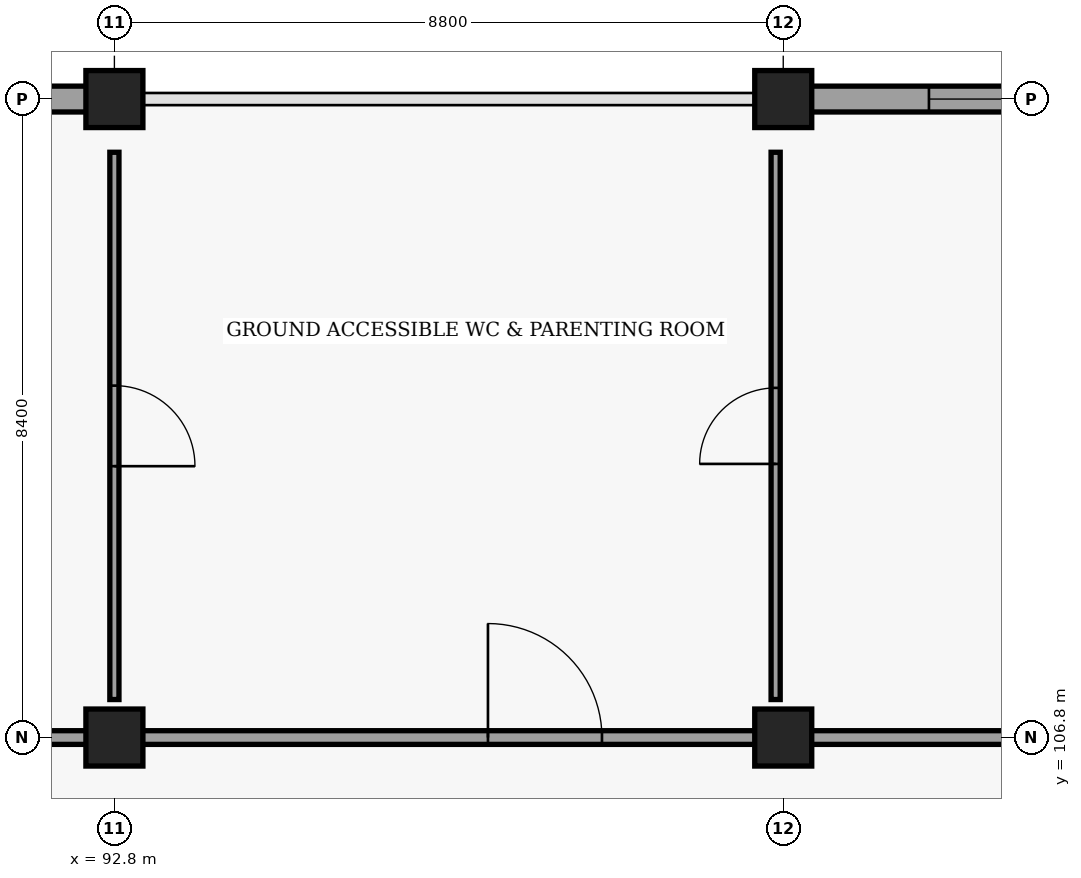
"""IFC4 building model, lengths in metres.
Left out: names, types, materials, properties, quantities, classifications, styles, units other than length and angle.
Written with IfcOpenShell. Run it as: python <this file> out.ifc"""

import sys

from ifc_helpers import new_model, si_unit, direction, frame, frame_2d, origin, origin_2d, place, context, subcontext, project, spatial, rectangle, extrude, element, fill, save


model = new_model("IFC4")
c1 = context("Model", 3, precision=1e-05, world=origin(), true_north=direction((0.0, 1.0)))
c2 = subcontext(c1, "Body", "Model", "MODEL_VIEW")
j1 = project(units=[si_unit("LENGTHUNIT", "METRE"), si_unit("PLANEANGLEUNIT", "RADIAN")], contexts=[c1])
p1 = place(None, origin())
s1 = spatial("IfcSite", under=j1, at=p1, CompositionType="ELEMENT")
p2 = place(p1, origin())
s2 = spatial("IfcBuilding", under=s1, at=p2, CompositionType="ELEMENT")
p3 = place(p2, origin())
s3 = spatial("IfcBuildingStorey", under=s2, at=p3, CompositionType="ELEMENT", Elevation=0.0)
for number, where, z_axis, x_axis in (
    (1, (92.8, 106.8, 0.0), (0.0, 0.0, 1.0), (1.0, 0.0, 0.0)),
    (2, (92.8, 115.2, 0.0), (0.0, 0.0, 1.0), (1.0, 0.0, 0.0)),
    (3, (101.6, 106.8, 0.0), (0.0, 0.0, 1.0), (1.0, 0.0, 0.0)),
    (4, (101.6, 115.2, 0.0), (0.0, 0.0, 1.0), (1.0, 0.0, 0.0)),
):
    element("IfcColumn", number, at=place(p3, frame(where, z_axis=z_axis, x_axis=x_axis)), inside=s3, PredefinedType="COLUMN", context=c2, shape_type="SweptSolid", body=[
        extrude(rectangle(XDim=0.75, YDim=0.75, at=origin_2d()), origin(), (0.0, 0.0, 1.0), 4.8),
    ])
p4 = place(p3, frame((84.1, 115.2, 0.0), z_axis=(0.0, 0.0, 1.0), x_axis=(1.0, 0.0, 0.0)))
e5 = element("IfcWall", 5, at=p4, inside=s3, PredefinedType="SOLIDWALL", context=c2, shape_type="SweptSolid", body=[
    extrude(rectangle(XDim=8.6, YDim=0.34, at=frame_2d((4.3, 0.0))), origin(), (0.0, 0.0, 1.0), 3.675),
])
p5 = place(p4, frame((1.817, 0.0, 0.95)))
e6 = element("IfcOpeningElement", 6, at=p5, cuts=e5, PredefinedType="OPENING", context=c2, shape_type="SweptSolid", body=[
    extrude(rectangle(XDim=2.1, YDim=1.8, at=frame_2d((1.05, 0.9))), frame((0.0, 0.18, 0.0), z_axis=(0.0, -1.0, 0.0), x_axis=(1.0, 0.0, 0.0)), (0.0, 0.0, 1.0), 0.36),
])
p6 = place(p4, frame((4.683, 0.0, 0.95)))
e7 = element("IfcOpeningElement", 7, at=p6, cuts=e5, PredefinedType="OPENING", context=c2, shape_type="SweptSolid", body=[
    extrude(rectangle(XDim=2.1, YDim=1.8, at=frame_2d((1.05, 0.9))), frame((0.0, 0.18, 0.0), z_axis=(0.0, -1.0, 0.0), x_axis=(1.0, 0.0, 0.0)), (0.0, 0.0, 1.0), 0.36),
])
p7 = place(p3, frame((101.7, 115.2, 0.0), z_axis=(0.0, 0.0, 1.0), x_axis=(1.0, 0.0, 0.0)))
e8 = element("IfcWall", 8, at=p7, inside=s3, PredefinedType="SOLIDWALL", context=c2, shape_type="SweptSolid", body=[
    extrude(rectangle(XDim=8.6, YDim=0.34, at=frame_2d((4.3, 0.0))), origin(), (0.0, 0.0, 1.0), 3.675),
])
p8 = place(p7, frame((1.817, 0.0, 0.95)))
e9 = element("IfcOpeningElement", 9, at=p8, cuts=e8, PredefinedType="OPENING", context=c2, shape_type="SweptSolid", body=[
    extrude(rectangle(XDim=2.1, YDim=1.8, at=frame_2d((1.05, 0.9))), frame((0.0, 0.18, 0.0), z_axis=(0.0, -1.0, 0.0), x_axis=(1.0, 0.0, 0.0)), (0.0, 0.0, 1.0), 0.36),
])
p9 = place(p7, frame((4.683, 0.0, 0.95)))
e10 = element("IfcOpeningElement", 10, at=p9, cuts=e8, PredefinedType="OPENING", context=c2, shape_type="SweptSolid", body=[
    extrude(rectangle(XDim=2.1, YDim=1.8, at=frame_2d((1.05, 0.9))), frame((0.0, 0.18, 0.0), z_axis=(0.0, -1.0, 0.0), x_axis=(1.0, 0.0, 0.0)), (0.0, 0.0, 1.0), 0.36),
])
p10 = place(p3, frame((84.2, 106.8, 0.0), z_axis=(0.0, 0.0, 1.0), x_axis=(1.0, 0.0, 0.0)))
e11 = element("IfcWall", 11, at=p10, inside=s3, PredefinedType="PARTITIONING", context=c2, shape_type="SweptSolid", body=[
    extrude(rectangle(XDim=28.53, YDim=0.18, at=frame_2d((14.265, 0.0))), origin(), (0.0, 0.0, 1.0), 3.675),
])
p11 = place(p10, frame((6.033, 0.0, 0.0)))
e12 = element("IfcOpeningElement", 12, at=p11, cuts=e11, PredefinedType="OPENING", context=c2, shape_type="SweptSolid", body=[
    extrude(rectangle(XDim=1.3, YDim=2.2, at=frame_2d((0.65, 1.1))), frame((0.0, 0.1, 0.0), z_axis=(0.0, -1.0, 0.0), x_axis=(1.0, 0.0, 0.0)), (0.0, 0.0, 1.0), 0.2),
])
p12 = place(p10, frame((13.515, 0.0, 0.0)))
e13 = element("IfcOpeningElement", 13, at=p12, cuts=e11, PredefinedType="OPENING", context=c2, shape_type="SweptSolid", body=[
    extrude(rectangle(XDim=1.5, YDim=2.25, at=frame_2d((0.75, 1.125))), frame((0.0, 0.1, 0.0), z_axis=(0.0, -1.0, 0.0), x_axis=(1.0, 0.0, 0.0)), (0.0, 0.0, 1.0), 0.2),
])
p13 = place(p10, frame((20.777, 0.0, 0.0)))
e14 = element("IfcOpeningElement", 14, at=p13, cuts=e11, PredefinedType="OPENING", context=c2, shape_type="SweptSolid", body=[
    extrude(rectangle(XDim=1.24, YDim=2.2, at=frame_2d((0.62, 1.1))), frame((0.0, 0.1, 0.0), z_axis=(0.0, -1.0, 0.0), x_axis=(1.0, 0.0, 0.0)), (0.0, 0.0, 1.0), 0.2),
])
p14 = place(p3, frame((92.8, 107.3, 0.0), z_axis=(0.0, 0.0, 1.0), x_axis=(0.0, 1.0, 0.0)))
e15 = element("IfcWall", 15, at=p14, inside=s3, PredefinedType="PARTITIONING", context=c2, shape_type="SweptSolid", body=[
    extrude(rectangle(XDim=7.2, YDim=0.12, at=frame_2d((3.6, 0.0))), origin(), (0.0, 0.0, 1.0), 3.775),
])
p15 = place(p14, frame((3.07, 0.0, 0.0)))
e16 = element("IfcOpeningElement", 16, at=p15, cuts=e15, PredefinedType="OPENING", context=c2, shape_type="SweptSolid", body=[
    extrude(rectangle(XDim=1.06, YDim=2.16, at=frame_2d((0.53, 1.08))), frame((0.0, 0.07, 0.0), z_axis=(0.0, -1.0, 0.0), x_axis=(1.0, 0.0, 0.0)), (0.0, 0.0, 1.0), 0.14),
])
p16 = place(p3, frame((101.5, 107.3, 0.0), z_axis=(0.0, 0.0, 1.0), x_axis=(0.0, 1.0, 0.0)))
e17 = element("IfcWall", 17, at=p16, inside=s3, PredefinedType="PARTITIONING", context=c2, shape_type="SweptSolid", body=[
    extrude(rectangle(XDim=7.2, YDim=0.12, at=frame_2d((3.6, 0.0))), origin(), (0.0, 0.0, 1.0), 3.775),
])
p17 = place(p16, frame((3.1, 0.0, 0.0)))
e18 = element("IfcOpeningElement", 18, at=p17, cuts=e17, PredefinedType="OPENING", context=c2, shape_type="SweptSolid", body=[
    extrude(rectangle(XDim=1.0, YDim=2.14, at=frame_2d((0.5, 1.07))), frame((0.0, 0.07, 0.0), z_axis=(0.0, -1.0, 0.0), x_axis=(1.0, 0.0, 0.0)), (0.0, 0.0, 1.0), 0.14),
])
p18 = place(p8, origin())
e19 = element("IfcWindow", 19, at=p18, inside=s3, PartitioningType="SINGLE_PANEL", PredefinedType="WINDOW", context=c2, shape_type="SweptSolid", body=[
    extrude(rectangle(XDim=2.1, YDim=1.8, at=frame_2d((1.05, 0.9))), frame((0.0, 0.03, 0.0), z_axis=(0.0, -1.0, 0.0), x_axis=(1.0, 0.0, 0.0)), (0.0, 0.0, 1.0), 0.06),
])
fill(e9, e19)
p19 = place(p12, origin())
e20 = element("IfcDoor", 20, at=p19, inside=s3, OperationType="DOUBLE_DOOR_SINGLE_SWING", PredefinedType="DOOR", context=c2, shape_type="SweptSolid", body=[
    extrude(rectangle(XDim=1.5, YDim=2.25, at=frame_2d((0.75, 1.125))), frame((0.0, 0.025, 0.0), z_axis=(0.0, -1.0, 0.0), x_axis=(1.0, 0.0, 0.0)), (0.0, 0.0, 1.0), 0.05),
])
fill(e13, e20)
p20 = place(p15, origin())
e21 = element("IfcDoor", 21, at=p20, inside=s3, OperationType="SINGLE_SWING_RIGHT", PredefinedType="DOOR", context=c2, shape_type="SweptSolid", body=[
    extrude(rectangle(XDim=1.06, YDim=2.16, at=frame_2d((0.53, 1.08))), frame((0.0, 0.025, 0.0), z_axis=(0.0, -1.0, 0.0), x_axis=(1.0, 0.0, 0.0)), (0.0, 0.0, 1.0), 0.05),
])
fill(e16, e21)
p21 = place(p17, origin())
e22 = element("IfcDoor", 22, at=p21, inside=s3, OperationType="SINGLE_SWING_LEFT", PredefinedType="DOOR", context=c2, shape_type="SweptSolid", body=[
    extrude(rectangle(XDim=1.0, YDim=2.14, at=frame_2d((0.5, 1.07))), frame((0.0, 0.025, 0.0), z_axis=(0.0, -1.0, 0.0), x_axis=(1.0, 0.0, 0.0)), (0.0, 0.0, 1.0), 0.05),
])
fill(e18, e22)
save(model, sys.argv[1])
